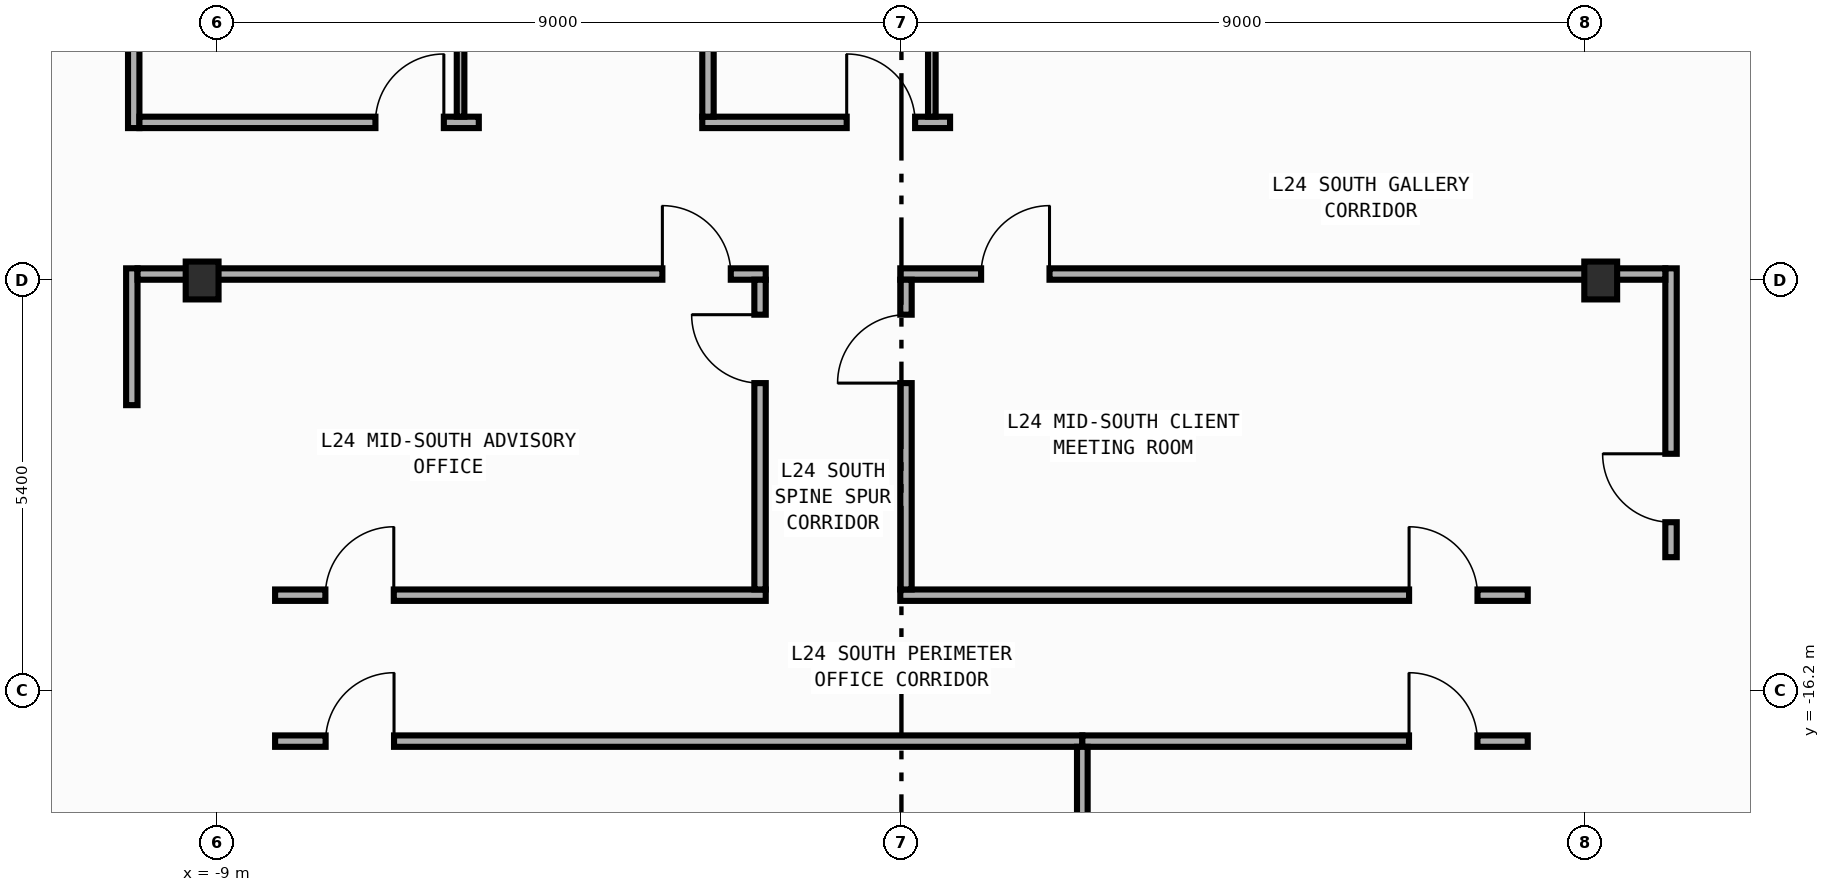
"""IFC4 building model, lengths in metres.
Left out: names, types, materials, properties, quantities, classifications, styles, units other than length and angle.
Written with IfcOpenShell. Run it as: python <this file> out.ifc"""

import sys

from ifc_helpers import new_model, si_unit, direction, frame, frame_2d, origin, origin_2d, place, context, subcontext, project, spatial, rectangle, i_section, extrude, element, fill, save


model = new_model("IFC4")
c1 = context("Model", 3, precision=1e-05, world=origin(), true_north=direction((0.0, 1.0)))
c2 = subcontext(c1, "Body", "Model", "MODEL_VIEW")
j1 = project(units=[si_unit("LENGTHUNIT", "METRE"), si_unit("PLANEANGLEUNIT", "RADIAN")], contexts=[c1])
p1 = place(None, origin())
s1 = spatial("IfcSite", under=j1, at=p1, CompositionType="ELEMENT")
p2 = place(p1, origin())
s2 = spatial("IfcBuilding", under=s1, at=p2, CompositionType="ELEMENT")
p3 = place(p2, frame((0.0, 0.0, 105.8)))
s3 = spatial("IfcBuildingStorey", under=s2, at=p3, CompositionType="ELEMENT", Elevation=105.8)
for number, where, z_axis, x_axis in (
    (1, (-9.2, -10.8, 0.0), (0.0, 0.0, 1.0), (1.0, 0.0, 0.0)),
    (2, (9.2, -10.8, 0.0), (0.0, 0.0, 1.0), (1.0, 0.0, 0.0)),
):
    element("IfcColumn", number, at=place(p3, frame(where, z_axis=z_axis, x_axis=x_axis)), inside=s3, PredefinedType="COLUMN", context=c2, shape_type="SweptSolid", body=[
        extrude(i_section(OverallWidth=0.432, OverallDepth=0.498, WebThickness=0.045, FlangeThickness=0.07, FilletRadius=0.022, at=origin_2d()), origin(), (0.0, 0.0, 1.0), 4.2),
    ])
p4 = place(p3, frame((-10.1, -8.795, 0.0), z_axis=(0.0, 0.0, 1.0), x_axis=(0.0, 1.0, 0.0)))
e3 = element("IfcWall", 3, at=p4, inside=s3, PredefinedType="PARTITIONING", context=c2, shape_type="SweptSolid", body=[
    extrude(rectangle(XDim=4.275, YDim=0.15, at=frame_2d((2.137, 0.0))), origin(), (0.0, 0.0, 1.0), 3.94),
])
p5 = place(p4, frame((2.915, 0.0, 0.0)))
e4 = element("IfcOpeningElement", 4, at=p5, cuts=e3, PredefinedType="OPENING", context=c2, shape_type="SweptSolid", body=[
    extrude(rectangle(XDim=0.9, YDim=2.15, at=frame_2d((0.45, 1.075))), frame((0.0, 0.085, 0.0), z_axis=(0.0, -1.0, 0.0), x_axis=(1.0, 0.0, 0.0)), (0.0, 0.0, 1.0), 0.17),
])
p6 = place(p3, frame((-10.125, -12.44, 0.0), z_axis=(0.0, 0.0, 1.0), x_axis=(0.0, 1.0, 0.0)))
e5 = element("IfcWall", 5, at=p6, inside=s3, PredefinedType="PARTITIONING", context=c2, shape_type="SweptSolid", body=[
    extrude(rectangle(XDim=1.8, YDim=0.15, at=frame_2d((0.9, 0.0))), origin(), (0.0, 0.0, 1.0), 3.94),
])
p7 = place(p3, frame((10.125, -14.44, 0.0), z_axis=(0.0, 0.0, 1.0), x_axis=(0.0, 1.0, 0.0)))
e6 = element("IfcWall", 6, at=p7, inside=s3, PredefinedType="PARTITIONING", context=c2, shape_type="SweptSolid", body=[
    extrude(rectangle(XDim=3.8, YDim=0.15, at=frame_2d((1.9, 0.0))), origin(), (0.0, 0.0, 1.0), 3.94),
])
p8 = place(p7, frame((0.46, 0.0, 0.0)))
e7 = element("IfcOpeningElement", 7, at=p8, cuts=e6, PredefinedType="OPENING", context=c2, shape_type="SweptSolid", body=[
    extrude(rectangle(XDim=0.9, YDim=2.15, at=frame_2d((0.45, 1.075))), frame((0.0, 0.085, 0.0), z_axis=(0.0, -1.0, 0.0), x_axis=(1.0, 0.0, 0.0)), (0.0, 0.0, 1.0), 0.17),
])
p9 = place(p3, frame((-2.62, -8.72, 0.0), z_axis=(0.0, 0.0, 1.0), x_axis=(1.0, 0.0, 0.0)))
e8 = element("IfcWall", 8, at=p9, inside=s3, PredefinedType="PARTITIONING", context=c2, shape_type="SweptSolid", body=[
    extrude(rectangle(XDim=3.26, YDim=0.15, at=frame_2d((1.63, 0.0))), origin(), (0.0, 0.0, 1.0), 3.94),
])
p10 = place(p9, frame((1.9, 0.0, 0.0)))
e9 = element("IfcOpeningElement", 9, at=p10, cuts=e8, PredefinedType="OPENING", context=c2, shape_type="SweptSolid", body=[
    extrude(rectangle(XDim=0.9, YDim=2.15, at=frame_2d((0.45, 1.075))), frame((0.0, 0.085, 0.0), z_axis=(0.0, -1.0, 0.0), x_axis=(1.0, 0.0, 0.0)), (0.0, 0.0, 1.0), 0.17),
])
p11 = place(p3, frame((-10.025, -8.72, 0.0), z_axis=(0.0, 0.0, 1.0), x_axis=(1.0, 0.0, 0.0)))
e10 = element("IfcWall", 10, at=p11, inside=s3, PredefinedType="PARTITIONING", context=c2, shape_type="SweptSolid", body=[
    extrude(rectangle(XDim=4.465, YDim=0.15, at=frame_2d((2.232, 0.0))), origin(), (0.0, 0.0, 1.0), 3.94),
])
p12 = place(p11, frame((3.105, 0.0, 0.0)))
e11 = element("IfcOpeningElement", 11, at=p12, cuts=e10, PredefinedType="OPENING", context=c2, shape_type="SweptSolid", body=[
    extrude(rectangle(XDim=0.9, YDim=2.15, at=frame_2d((0.45, 1.075))), frame((0.0, 0.085, 0.0), z_axis=(0.0, -1.0, 0.0), x_axis=(1.0, 0.0, 0.0)), (0.0, 0.0, 1.0), 0.17),
])
p13 = place(p3, frame((-10.05, -10.715, 0.0), z_axis=(0.0, 0.0, 1.0), x_axis=(1.0, 0.0, 0.0)))
e12 = element("IfcWall", 12, at=p13, inside=s3, PredefinedType="PARTITIONING", context=c2, shape_type="SweptSolid", body=[
    extrude(rectangle(XDim=8.265, YDim=0.15, at=frame_2d((4.133, 0.0))), origin(), (0.0, 0.0, 1.0), 3.24),
])
p14 = place(p13, frame((6.905, 0.0, 0.0)))
e13 = element("IfcOpeningElement", 13, at=p14, cuts=e12, PredefinedType="OPENING", context=c2, shape_type="SweptSolid", body=[
    extrude(rectangle(XDim=0.9, YDim=2.15, at=frame_2d((0.45, 1.075))), frame((0.0, 0.085, 0.0), z_axis=(0.0, -1.0, 0.0), x_axis=(1.0, 0.0, 0.0)), (0.0, 0.0, 1.0), 0.17),
])
p15 = place(p3, frame((-0.015, -10.715, 0.0), z_axis=(0.0, 0.0, 1.0), x_axis=(1.0, 0.0, 0.0)))
e14 = element("IfcWall", 14, at=p15, inside=s3, PredefinedType="PARTITIONING", context=c2, shape_type="SweptSolid", body=[
    extrude(rectangle(XDim=10.065, YDim=0.15, at=frame_2d((5.032, 0.0))), origin(), (0.0, 0.0, 1.0), 3.24),
])
p16 = place(p15, frame((1.063, 0.0, 0.0)))
e15 = element("IfcOpeningElement", 15, at=p16, cuts=e14, PredefinedType="OPENING", context=c2, shape_type="SweptSolid", body=[
    extrude(rectangle(XDim=0.9, YDim=2.15, at=frame_2d((0.45, 1.075))), frame((0.0, 0.085, 0.0), z_axis=(0.0, -1.0, 0.0), x_axis=(1.0, 0.0, 0.0)), (0.0, 0.0, 1.0), 0.17),
])
p17 = place(p3, frame((-2.545, -8.645, 0.0), z_axis=(0.0, 0.0, 1.0), x_axis=(0.0, 1.0, 0.0)))
e16 = element("IfcWall", 16, at=p17, inside=s3, PredefinedType="PARTITIONING", context=c2, shape_type="SweptSolid", body=[
    extrude(rectangle(XDim=2.825, YDim=0.15, at=frame_2d((1.413, 0.0))), origin(), (0.0, 0.0, 1.0), 3.94),
])
p18 = place(p17, frame((1.465, 0.0, 0.0)))
e17 = element("IfcOpeningElement", 17, at=p18, cuts=e16, PredefinedType="OPENING", context=c2, shape_type="SweptSolid", body=[
    extrude(rectangle(XDim=0.9, YDim=2.15, at=frame_2d((0.45, 1.075))), frame((0.0, 0.085, 0.0), z_axis=(0.0, -1.0, 0.0), x_axis=(1.0, 0.0, 0.0)), (0.0, 0.0, 1.0), 0.17),
])
p19 = place(p3, frame((-8.24, -16.86, 0.0), z_axis=(0.0, 0.0, 1.0), x_axis=(1.0, 0.0, 0.0)))
e18 = element("IfcWall", 18, at=p19, inside=s3, PredefinedType="PARTITIONING", context=c2, shape_type="SweptSolid", body=[
    extrude(rectangle(XDim=10.62, YDim=0.15, at=frame_2d((5.31, 0.0))), origin(), (0.0, 0.0, 1.0), 3.94),
])
p20 = place(p19, frame((0.665, 0.0, 0.0)))
e19 = element("IfcOpeningElement", 19, at=p20, cuts=e18, PredefinedType="OPENING", context=c2, shape_type="SweptSolid", body=[
    extrude(rectangle(XDim=0.9, YDim=2.15, at=frame_2d((0.45, 1.075))), frame((0.0, 0.085, 0.0), z_axis=(0.0, -1.0, 0.0), x_axis=(1.0, 0.0, 0.0)), (0.0, 0.0, 1.0), 0.17),
])
p21 = place(p3, frame((2.38, -16.86, 0.0), z_axis=(0.0, 0.0, 1.0), x_axis=(1.0, 0.0, 0.0)))
e20 = element("IfcWall", 20, at=p21, inside=s3, PredefinedType="PARTITIONING", context=c2, shape_type="SweptSolid", body=[
    extrude(rectangle(XDim=5.86, YDim=0.15, at=frame_2d((2.93, 0.0))), origin(), (0.0, 0.0, 1.0), 3.94),
])
p22 = place(p21, frame((4.298, 0.0, 0.0)))
e21 = element("IfcOpeningElement", 21, at=p22, cuts=e20, PredefinedType="OPENING", context=c2, shape_type="SweptSolid", body=[
    extrude(rectangle(XDim=0.9, YDim=2.15, at=frame_2d((0.45, 1.075))), frame((0.0, 0.085, 0.0), z_axis=(0.0, -1.0, 0.0), x_axis=(1.0, 0.0, 0.0)), (0.0, 0.0, 1.0), 0.17),
])
p23 = place(p3, frame((-8.24, -14.94, 0.0), z_axis=(0.0, 0.0, 1.0), x_axis=(1.0, 0.0, 0.0)))
e22 = element("IfcWall", 22, at=p23, inside=s3, PredefinedType="PARTITIONING", context=c2, shape_type="SweptSolid", body=[
    extrude(rectangle(XDim=6.455, YDim=0.15, at=frame_2d((3.228, 0.0))), origin(), (0.0, 0.0, 1.0), 3.94),
])
p24 = place(p23, frame((0.662, 0.0, 0.0)))
e23 = element("IfcOpeningElement", 23, at=p24, cuts=e22, PredefinedType="OPENING", context=c2, shape_type="SweptSolid", body=[
    extrude(rectangle(XDim=0.9, YDim=2.15, at=frame_2d((0.45, 1.075))), frame((0.0, 0.085, 0.0), z_axis=(0.0, -1.0, 0.0), x_axis=(1.0, 0.0, 0.0)), (0.0, 0.0, 1.0), 0.17),
])
p25 = place(p3, frame((-0.015, -14.94, 0.0), z_axis=(0.0, 0.0, 1.0), x_axis=(1.0, 0.0, 0.0)))
e24 = element("IfcWall", 24, at=p25, inside=s3, PredefinedType="PARTITIONING", context=c2, shape_type="SweptSolid", body=[
    extrude(rectangle(XDim=8.255, YDim=0.15, at=frame_2d((4.127, 0.0))), origin(), (0.0, 0.0, 1.0), 3.94),
])
p26 = place(p25, frame((6.694, 0.0, 0.0)))
e25 = element("IfcOpeningElement", 25, at=p26, cuts=e24, PredefinedType="OPENING", context=c2, shape_type="SweptSolid", body=[
    extrude(rectangle(XDim=0.9, YDim=2.15, at=frame_2d((0.45, 1.075))), frame((0.0, 0.085, 0.0), z_axis=(0.0, -1.0, 0.0), x_axis=(1.0, 0.0, 0.0)), (0.0, 0.0, 1.0), 0.17),
])
p27 = place(p3, frame((-1.86, -14.865, 0.0), z_axis=(0.0, 0.0, 1.0), x_axis=(0.0, 1.0, 0.0)))
e26 = element("IfcWall", 26, at=p27, inside=s3, PredefinedType="PARTITIONING", context=c2, shape_type="SweptSolid", body=[
    extrude(rectangle(XDim=4.075, YDim=0.15, at=frame_2d((2.038, 0.0))), origin(), (0.0, 0.0, 1.0), 3.94),
])
p28 = place(p27, frame((2.715, 0.0, 0.0)))
e27 = element("IfcOpeningElement", 27, at=p28, cuts=e26, PredefinedType="OPENING", context=c2, shape_type="SweptSolid", body=[
    extrude(rectangle(XDim=0.9, YDim=2.15, at=frame_2d((0.45, 1.075))), frame((0.0, 0.085, 0.0), z_axis=(0.0, -1.0, 0.0), x_axis=(1.0, 0.0, 0.0)), (0.0, 0.0, 1.0), 0.17),
])
p29 = place(p3, frame((0.06, -14.865, 0.0), z_axis=(0.0, 0.0, 1.0), x_axis=(0.0, 1.0, 0.0)))
e28 = element("IfcWall", 28, at=p29, inside=s3, PredefinedType="PARTITIONING", context=c2, shape_type="SweptSolid", body=[
    extrude(rectangle(XDim=4.075, YDim=0.15, at=frame_2d((2.038, 0.0))), origin(), (0.0, 0.0, 1.0), 3.94),
])
p30 = place(p29, frame((2.715, 0.0, 0.0)))
e29 = element("IfcOpeningElement", 29, at=p30, cuts=e28, PredefinedType="OPENING", context=c2, shape_type="SweptSolid", body=[
    extrude(rectangle(XDim=0.9, YDim=2.15, at=frame_2d((0.45, 1.075))), frame((0.0, 0.085, 0.0), z_axis=(0.0, -1.0, 0.0), x_axis=(1.0, 0.0, 0.0)), (0.0, 0.0, 1.0), 0.17),
])
p31 = place(p3, frame((2.38, -26.055, 0.0), z_axis=(0.0, 0.0, 1.0), x_axis=(0.0, 1.0, 0.0)))
e30 = element("IfcWall", 30, at=p31, inside=s3, PredefinedType="PARTITIONING", context=c2, shape_type="SweptSolid", body=[
    extrude(rectangle(XDim=9.12, YDim=0.14, at=frame_2d((4.56, 0.0))), origin(), (0.0, 0.0, 1.0), 3.94),
])
p32 = place(p3, frame((0.4, -5.89, 0.0), z_axis=(0.0, 0.0, 1.0), x_axis=(0.0, -1.0, 0.0)))
e31 = element("IfcWall", 31, at=p32, inside=s3, PredefinedType="PARTITIONING", context=c2, shape_type="SweptSolid", body=[
    extrude(rectangle(XDim=2.755, YDim=0.1, at=frame_2d((1.377, 0.0))), origin(), (0.0, 0.0, 1.0), 3.94),
])
p33 = place(p3, frame((-5.8, -4.59, 0.0), z_axis=(0.0, 0.0, 1.0), x_axis=(0.0, -1.0, 0.0)))
e32 = element("IfcWall", 32, at=p33, inside=s3, PredefinedType="PARTITIONING", context=c2, shape_type="SweptSolid", body=[
    extrude(rectangle(XDim=4.055, YDim=0.1, at=frame_2d((2.027, 0.0))), origin(), (0.0, 0.0, 1.0), 3.94),
])
p34 = place(p8, origin())
e33 = element("IfcDoor", 33, at=p34, inside=s3, OperationType="SINGLE_SWING_RIGHT", PredefinedType="DOOR", context=c2, shape_type="SweptSolid", body=[
    extrude(rectangle(XDim=0.9, YDim=2.15, at=frame_2d((0.45, 1.075))), frame((0.0, 0.025, 0.0), z_axis=(0.0, -1.0, 0.0), x_axis=(1.0, 0.0, 0.0)), (0.0, 0.0, 1.0), 0.05),
])
fill(e7, e33)
p35 = place(p10, origin())
e34 = element("IfcDoor", 34, at=p35, inside=s3, OperationType="SINGLE_SWING_LEFT", PredefinedType="DOOR", context=c2, shape_type="SweptSolid", body=[
    extrude(rectangle(XDim=0.9, YDim=2.15, at=frame_2d((0.45, 1.075))), frame((0.0, 0.025, 0.0), z_axis=(0.0, -1.0, 0.0), x_axis=(1.0, 0.0, 0.0)), (0.0, 0.0, 1.0), 0.05),
])
fill(e9, e34)
p36 = place(p12, origin())
e35 = element("IfcDoor", 35, at=p36, inside=s3, OperationType="SINGLE_SWING_RIGHT", PredefinedType="DOOR", context=c2, shape_type="SweptSolid", body=[
    extrude(rectangle(XDim=0.9, YDim=2.15, at=frame_2d((0.45, 1.075))), frame((0.0, 0.025, 0.0), z_axis=(0.0, -1.0, 0.0), x_axis=(1.0, 0.0, 0.0)), (0.0, 0.0, 1.0), 0.05),
])
fill(e11, e35)
p37 = place(p14, origin())
e36 = element("IfcDoor", 36, at=p37, inside=s3, OperationType="SINGLE_SWING_LEFT", PredefinedType="DOOR", context=c2, shape_type="SweptSolid", body=[
    extrude(rectangle(XDim=0.9, YDim=2.15, at=frame_2d((0.45, 1.075))), frame((0.0, 0.025, 0.0), z_axis=(0.0, -1.0, 0.0), x_axis=(1.0, 0.0, 0.0)), (0.0, 0.0, 1.0), 0.05),
])
fill(e13, e36)
p38 = place(p16, origin())
e37 = element("IfcDoor", 37, at=p38, inside=s3, OperationType="SINGLE_SWING_RIGHT", PredefinedType="DOOR", context=c2, shape_type="SweptSolid", body=[
    extrude(rectangle(XDim=0.9, YDim=2.15, at=frame_2d((0.45, 1.075))), frame((0.0, 0.025, 0.0), z_axis=(0.0, -1.0, 0.0), x_axis=(1.0, 0.0, 0.0)), (0.0, 0.0, 1.0), 0.05),
])
fill(e15, e37)
p39 = place(p20, origin())
e38 = element("IfcDoor", 38, at=p39, inside=s3, OperationType="SINGLE_SWING_RIGHT", PredefinedType="DOOR", context=c2, shape_type="SweptSolid", body=[
    extrude(rectangle(XDim=0.9, YDim=2.15, at=frame_2d((0.45, 1.075))), frame((0.0, 0.025, 0.0), z_axis=(0.0, -1.0, 0.0), x_axis=(1.0, 0.0, 0.0)), (0.0, 0.0, 1.0), 0.05),
])
fill(e19, e38)
p40 = place(p22, origin())
e39 = element("IfcDoor", 39, at=p40, inside=s3, OperationType="SINGLE_SWING_LEFT", PredefinedType="DOOR", context=c2, shape_type="SweptSolid", body=[
    extrude(rectangle(XDim=0.9, YDim=2.15, at=frame_2d((0.45, 1.075))), frame((0.0, 0.025, 0.0), z_axis=(0.0, -1.0, 0.0), x_axis=(1.0, 0.0, 0.0)), (0.0, 0.0, 1.0), 0.05),
])
fill(e21, e39)
p41 = place(p24, origin())
e40 = element("IfcDoor", 40, at=p41, inside=s3, OperationType="SINGLE_SWING_RIGHT", PredefinedType="DOOR", context=c2, shape_type="SweptSolid", body=[
    extrude(rectangle(XDim=0.9, YDim=2.15, at=frame_2d((0.45, 1.075))), frame((0.0, 0.025, 0.0), z_axis=(0.0, -1.0, 0.0), x_axis=(1.0, 0.0, 0.0)), (0.0, 0.0, 1.0), 0.05),
])
fill(e23, e40)
p42 = place(p26, origin())
e41 = element("IfcDoor", 41, at=p42, inside=s3, OperationType="SINGLE_SWING_LEFT", PredefinedType="DOOR", context=c2, shape_type="SweptSolid", body=[
    extrude(rectangle(XDim=0.9, YDim=2.15, at=frame_2d((0.45, 1.075))), frame((0.0, 0.025, 0.0), z_axis=(0.0, -1.0, 0.0), x_axis=(1.0, 0.0, 0.0)), (0.0, 0.0, 1.0), 0.05),
])
fill(e25, e41)
p43 = place(p28, origin())
e42 = element("IfcDoor", 42, at=p43, inside=s3, OperationType="SINGLE_SWING_RIGHT", PredefinedType="DOOR", context=c2, shape_type="SweptSolid", body=[
    extrude(rectangle(XDim=0.9, YDim=2.15, at=frame_2d((0.45, 1.075))), frame((0.0, 0.025, 0.0), z_axis=(0.0, -1.0, 0.0), x_axis=(1.0, 0.0, 0.0)), (0.0, 0.0, 1.0), 0.05),
])
fill(e27, e42)
p44 = place(p30, origin())
e43 = element("IfcDoor", 43, at=p44, inside=s3, OperationType="SINGLE_SWING_LEFT", PredefinedType="DOOR", context=c2, shape_type="SweptSolid", body=[
    extrude(rectangle(XDim=0.9, YDim=2.15, at=frame_2d((0.45, 1.075))), frame((0.0, 0.025, 0.0), z_axis=(0.0, -1.0, 0.0), x_axis=(1.0, 0.0, 0.0)), (0.0, 0.0, 1.0), 0.05),
])
fill(e29, e43)
save(model, sys.argv[1])
